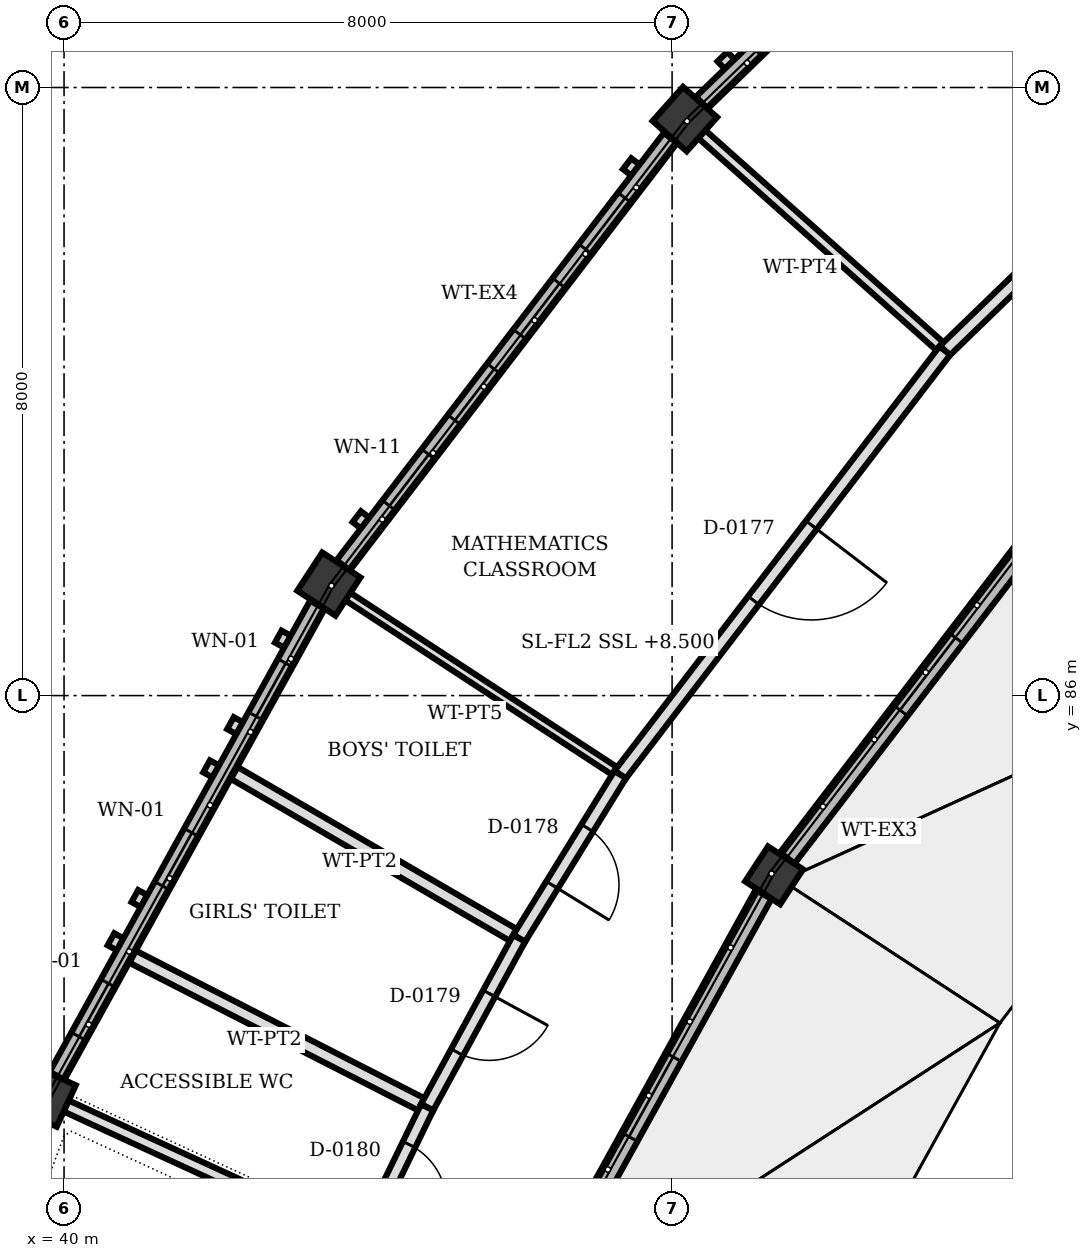
"""IFC4 building model, lengths in metres.
Left out: names, types, materials, properties, quantities, classifications, styles, units other than length and angle.
Written with IfcOpenShell. Run it as: python <this file> out.ifc"""

import sys

from ifc_helpers import new_model, si_unit, direction, frame, frame_2d, origin, origin_2d, place, context, subcontext, project, spatial, rectangle, extrude, element, fill, save


model = new_model("IFC4")
c1 = context("Model", 3, precision=1e-05, world=origin(), true_north=direction((0.0, 1.0)))
c2 = subcontext(c1, "Body", "Model", "MODEL_VIEW")
j1 = project(units=[si_unit("LENGTHUNIT", "METRE"), si_unit("PLANEANGLEUNIT", "RADIAN")], contexts=[c1])
p1 = place(None, origin())
s1 = spatial("IfcSite", under=j1, at=p1, CompositionType="ELEMENT")
p2 = place(p1, origin())
s2 = spatial("IfcBuilding", under=s1, at=p2, CompositionType="ELEMENT")
p3 = place(p2, frame((0.0, 0.0, 8.5)))
s3 = spatial("IfcBuildingStorey", under=s2, at=p3, CompositionType="ELEMENT", Elevation=8.5)
p4 = place(p3, frame((49.342, 83.635, 0.0), z_axis=(0.0, 0.0, 1.0), x_axis=(-0.836840759551, 0.547446383817, 0.0)))
e1 = element("IfcColumn", 1, at=p4, inside=s3, PredefinedType="COLUMN", context=c2, shape_type="SweptSolid", body=[
    extrude(rectangle(XDim=0.55, YDim=0.55, at=origin_2d()), origin(), (0.0, 0.0, 1.0), 4.0),
])
for number, where, z_axis, x_axis in (
    (2, (48.168, 93.584, 0.0), (0.0, 0.0, 1.0), (-0.747, 0.665, 0.0)),
    (3, (43.484, 87.467, 0.0), (0.0, 0.0, 1.0), (-0.837, 0.547, 0.0)),
    (4, (39.756, 80.726, 0.0), (0.0, 0.0, 1.0), (-0.909, 0.418, 0.0)),
):
    element("IfcColumn", number, at=place(p3, frame(where, z_axis=z_axis, x_axis=x_axis)), inside=s3, PredefinedType="COLUMN", context=c2, shape_type="SweptSolid", body=[
        extrude(rectangle(XDim=0.6, YDim=0.6, at=origin_2d()), origin(), (0.0, 0.0, 1.0), 4.0),
    ])
p5 = place(p3, frame((48.391, 93.8, 0.0), z_axis=(0.0, 0.0, 1.0), x_axis=(0.71857824473, 0.695446120272, 0.0)))
e5 = element("IfcWall", 5, at=p5, inside=s3, PredefinedType="SOLIDWALL", context=c2, shape_type="SweptSolid", body=[
    extrude(rectangle(XDim=7.082, YDim=0.22, at=frame_2d((3.541, 0.0))), origin(), (0.0, 0.0, 1.0), 3.192),
])
p6 = place(p5, frame((0.991, 0.0, 0.85)))
e6 = element("IfcOpeningElement", 6, at=p6, cuts=e5, PredefinedType="OPENING", context=c2, shape_type="SweptSolid", body=[
    extrude(rectangle(XDim=0.85, YDim=1.25, at=frame_2d((0.425, 0.625))), frame((0.0, 0.12, 0.0), z_axis=(0.0, -1.0, 0.0), x_axis=(1.0, 0.0, 0.0)), (0.0, 0.0, 1.0), 0.24),
])
p7 = place(p5, frame((2.408, 0.0, 0.85)))
e7 = element("IfcOpeningElement", 7, at=p7, cuts=e5, PredefinedType="OPENING", context=c2, shape_type="SweptSolid", body=[
    extrude(rectangle(XDim=0.85, YDim=1.25, at=frame_2d((0.425, 0.625))), frame((0.0, 0.12, 0.0), z_axis=(0.0, -1.0, 0.0), x_axis=(1.0, 0.0, 0.0)), (0.0, 0.0, 1.0), 0.24),
])
p8 = place(p5, frame((3.824, 0.0, 0.85)))
e8 = element("IfcOpeningElement", 8, at=p8, cuts=e5, PredefinedType="OPENING", context=c2, shape_type="SweptSolid", body=[
    extrude(rectangle(XDim=0.85, YDim=1.25, at=frame_2d((0.425, 0.625))), frame((0.0, 0.12, 0.0), z_axis=(0.0, -1.0, 0.0), x_axis=(1.0, 0.0, 0.0)), (0.0, 0.0, 1.0), 0.24),
])
p9 = place(p5, frame((5.241, 0.0, 0.85)))
e9 = element("IfcOpeningElement", 9, at=p9, cuts=e5, PredefinedType="OPENING", context=c2, shape_type="SweptSolid", body=[
    extrude(rectangle(XDim=0.85, YDim=1.25, at=frame_2d((0.425, 0.625))), frame((0.0, 0.12, 0.0), z_axis=(0.0, -1.0, 0.0), x_axis=(1.0, 0.0, 0.0)), (0.0, 0.0, 1.0), 0.24),
])
p10 = place(p3, frame((43.673, 87.714, 0.0), z_axis=(0.0, 0.0, 1.0), x_axis=(0.607995054755, 0.793940812273, 0.0)))
e10 = element("IfcWall", 10, at=p10, inside=s3, PredefinedType="SOLIDWALL", context=c2, shape_type="SweptSolid", body=[
    extrude(rectangle(XDim=7.082, YDim=0.22, at=frame_2d((3.541, 0.0))), origin(), (0.0, 0.0, 1.0), 3.192),
])
p11 = place(p10, frame((0.991, 0.0, 0.85)))
e11 = element("IfcOpeningElement", 11, at=p11, cuts=e10, PredefinedType="OPENING", context=c2, shape_type="SweptSolid", body=[
    extrude(rectangle(XDim=0.85, YDim=1.25, at=frame_2d((0.425, 0.625))), frame((0.0, 0.12, 0.0), z_axis=(0.0, -1.0, 0.0), x_axis=(1.0, 0.0, 0.0)), (0.0, 0.0, 1.0), 0.24),
])
p12 = place(p10, frame((2.408, 0.0, 0.85)))
e12 = element("IfcOpeningElement", 12, at=p12, cuts=e10, PredefinedType="OPENING", context=c2, shape_type="SweptSolid", body=[
    extrude(rectangle(XDim=0.85, YDim=1.25, at=frame_2d((0.425, 0.625))), frame((0.0, 0.12, 0.0), z_axis=(0.0, -1.0, 0.0), x_axis=(1.0, 0.0, 0.0)), (0.0, 0.0, 1.0), 0.24),
])
p13 = place(p10, frame((3.824, 0.0, 0.85)))
e13 = element("IfcOpeningElement", 13, at=p13, cuts=e10, PredefinedType="OPENING", context=c2, shape_type="SweptSolid", body=[
    extrude(rectangle(XDim=0.85, YDim=1.25, at=frame_2d((0.425, 0.625))), frame((0.0, 0.12, 0.0), z_axis=(0.0, -1.0, 0.0), x_axis=(1.0, 0.0, 0.0)), (0.0, 0.0, 1.0), 0.24),
])
p14 = place(p10, frame((5.241, 0.0, 0.85)))
e14 = element("IfcOpeningElement", 14, at=p14, cuts=e10, PredefinedType="OPENING", context=c2, shape_type="SweptSolid", body=[
    extrude(rectangle(XDim=0.85, YDim=1.25, at=frame_2d((0.425, 0.625))), frame((0.0, 0.12, 0.0), z_axis=(0.0, -1.0, 0.0), x_axis=(1.0, 0.0, 0.0)), (0.0, 0.0, 1.0), 0.24),
])
p15 = place(p3, frame((53.221, 88.7, 0.0), z_axis=(0.0, 0.0, 1.0), x_axis=(-0.608073116508, -0.793881026969, 0.0)))
e15 = element("IfcWall", 15, at=p15, inside=s3, PredefinedType="SOLIDWALL", context=c2, shape_type="SweptSolid", body=[
    extrude(rectangle(XDim=6.093, YDim=0.24, at=frame_2d((3.046, 0.0))), origin(), (0.0, 0.0, 1.0), 3.05),
])
p16 = place(p15, frame((2.446, 0.0, 2.05)))
e16 = element("IfcOpeningElement", 16, at=p16, cuts=e15, PredefinedType="OPENING", context=c2, shape_type="SweptSolid", body=[
    extrude(rectangle(XDim=1.2, YDim=0.85, at=frame_2d((0.6, 0.425))), frame((0.0, 0.13, 0.0), z_axis=(0.0, -1.0, 0.0), x_axis=(1.0, 0.0, 0.0)), (0.0, 0.0, 1.0), 0.26),
])
p17 = place(p3, frame((39.907, 80.998, 0.0), z_axis=(0.0, 0.0, 1.0), x_axis=(0.483832760768, 0.875160476489, 0.0)))
e17 = element("IfcWall", 17, at=p17, inside=s3, PredefinedType="SOLIDWALL", context=c2, shape_type="SweptSolid", body=[
    extrude(rectangle(XDim=7.081, YDim=0.22, at=frame_2d((3.541, 0.0))), origin(), (0.0, 0.0, 1.0), 3.192),
])
p18 = place(p17, frame((0.591, 0.0, 1.15)))
e18 = element("IfcOpeningElement", 18, at=p18, cuts=e17, PredefinedType="OPENING", context=c2, shape_type="SweptSolid", body=[
    extrude(rectangle(XDim=0.8, YDim=1.1, at=frame_2d((0.4, 0.55))), frame((0.0, 0.12, 0.0), z_axis=(0.0, -1.0, 0.0), x_axis=(1.0, 0.0, 0.0)), (0.0, 0.0, 1.0), 0.24),
])
p19 = place(p17, frame((2.857, 0.0, 1.15)))
e19 = element("IfcOpeningElement", 19, at=p19, cuts=e17, PredefinedType="OPENING", context=c2, shape_type="SweptSolid", body=[
    extrude(rectangle(XDim=0.8, YDim=1.1, at=frame_2d((0.4, 0.55))), frame((0.0, 0.12, 0.0), z_axis=(0.0, -1.0, 0.0), x_axis=(1.0, 0.0, 0.0)), (0.0, 0.0, 1.0), 0.24),
])
p20 = place(p17, frame((5.406, 0.0, 1.15)))
e20 = element("IfcOpeningElement", 20, at=p20, cuts=e17, PredefinedType="OPENING", context=c2, shape_type="SweptSolid", body=[
    extrude(rectangle(XDim=0.8, YDim=1.1, at=frame_2d((0.4, 0.55))), frame((0.0, 0.12, 0.0), z_axis=(0.0, -1.0, 0.0), x_axis=(1.0, 0.0, 0.0)), (0.0, 0.0, 1.0), 0.24),
])
p21 = place(p3, frame((49.203, 83.384, 0.0), z_axis=(0.0, 0.0, 1.0), x_axis=(-0.483855739492, -0.875147772299, 0.0)))
e21 = element("IfcWall", 21, at=p21, inside=s3, PredefinedType="SOLIDWALL", context=c2, shape_type="SweptSolid", body=[
    extrude(rectangle(XDim=6.093, YDim=0.24, at=frame_2d((3.046, 0.0))), origin(), (0.0, 0.0, 1.0), 3.05),
])
p22 = place(p21, frame((2.446, 0.0, 2.05)))
e22 = element("IfcOpeningElement", 22, at=p22, cuts=e21, PredefinedType="OPENING", context=c2, shape_type="SweptSolid", body=[
    extrude(rectangle(XDim=1.2, YDim=0.85, at=frame_2d((0.6, 0.425))), frame((0.0, 0.13, 0.0), z_axis=(0.0, -1.0, 0.0), x_axis=(1.0, 0.0, 0.0)), (0.0, 0.0, 1.0), 0.26),
])
p23 = place(p3, frame((51.588, 90.538, 0.0), z_axis=(0.0, 0.0, 1.0), x_axis=(-0.746752390412, 0.665102148105, 0.0)))
e23 = element("IfcWall", 23, at=p23, inside=s3, PredefinedType="PARTITIONING", context=c2, shape_type="SweptSolid", body=[
    extrude(rectangle(XDim=4.288, YDim=0.14, at=frame_2d((2.144, 0.0))), origin(), (0.0, 0.0, 1.0), 3.092),
])
p24 = place(p3, frame((47.317, 84.96, 0.0), z_axis=(0.0, 0.0, 1.0), x_axis=(-0.836931498536, 0.54730765275, 0.0)))
e24 = element("IfcWall", 24, at=p24, inside=s3, PredefinedType="PARTITIONING", context=c2, shape_type="SweptSolid", body=[
    extrude(rectangle(XDim=4.288, YDim=0.12, at=frame_2d((2.144, 0.0))), origin(), (0.0, 0.0, 1.0), 3.092),
])
p25 = place(p3, frame((43.917, 78.812, 0.0), z_axis=(0.0, 0.0, 1.0), x_axis=(-0.908505150055, 0.417873655934, 0.0)))
e25 = element("IfcWall", 25, at=p25, inside=s3, PredefinedType="PARTITIONING", context=c2, shape_type="SweptSolid", body=[
    extrude(rectangle(XDim=4.288, YDim=0.16, at=frame_2d((2.144, 0.0))), origin(), (0.0, 0.0, 1.0), 3.092),
])
p26 = place(p3, frame((45.988, 82.806, 0.0), z_axis=(0.0, 0.0, 1.0), x_axis=(-0.864871773355, 0.501992844225, 0.0)))
e26 = element("IfcWall", 26, at=p26, inside=s3, PredefinedType="PARTITIONING", context=c2, shape_type="SweptSolid", body=[
    extrude(rectangle(XDim=4.335, YDim=0.18, at=frame_2d((2.167, 0.0))), origin(), (0.0, 0.0, 1.0), 3.192),
])
p27 = place(p3, frame((44.777, 80.583, 0.0), z_axis=(0.0, 0.0, 1.0), x_axis=(-0.890397294755, 0.455184201717, 0.0)))
e27 = element("IfcWall", 27, at=p27, inside=s3, PredefinedType="PARTITIONING", context=c2, shape_type="SweptSolid", body=[
    extrude(rectangle(XDim=4.352, YDim=0.18, at=frame_2d((2.176, 0.0))), origin(), (0.0, 0.0, 1.0), 3.192),
])
p28 = place(p3, frame((56.636, 95.424, 0.0), z_axis=(0.0, 0.0, 1.0), x_axis=(-0.718550040998, -0.695475260942, 0.0)))
e28 = element("IfcWall", 28, at=p28, inside=s3, PredefinedType="PARTITIONING", context=c2, shape_type="SweptSolid", body=[
    extrude(rectangle(XDim=7.025, YDim=0.18, at=frame_2d((3.513, 0.0))), origin(), (0.0, 0.0, 1.0), 3.092),
])
p29 = place(p28, frame((3.023, 0.0, 0.0)))
e29 = element("IfcOpeningElement", 29, at=p29, cuts=e28, PredefinedType="OPENING", context=c2, shape_type="SweptSolid", body=[
    extrude(rectangle(XDim=0.98, YDim=2.2, at=frame_2d((0.49, 1.1))), frame((0.0, 0.1, 0.0), z_axis=(0.0, -1.0, 0.0), x_axis=(1.0, 0.0, 0.0)), (0.0, 0.0, 1.0), 0.2),
])
p30 = place(p3, frame((51.588, 90.538, 0.0), z_axis=(0.0, 0.0, 1.0), x_axis=(-0.607932411016, -0.793988780548, 0.0)))
e30 = element("IfcWall", 30, at=p30, inside=s3, PredefinedType="PARTITIONING", context=c2, shape_type="SweptSolid", body=[
    extrude(rectangle(XDim=7.025, YDim=0.18, at=frame_2d((3.513, 0.0))), origin(), (0.0, 0.0, 1.0), 3.092),
])
p31 = place(p30, frame((2.888, 0.0, 0.0)))
e31 = element("IfcOpeningElement", 31, at=p31, cuts=e30, PredefinedType="OPENING", context=c2, shape_type="SweptSolid", body=[
    extrude(rectangle(XDim=1.25, YDim=2.2, at=frame_2d((0.625, 1.1))), frame((0.0, 0.1, 0.0), z_axis=(0.0, -1.0, 0.0), x_axis=(1.0, 0.0, 0.0)), (0.0, 0.0, 1.0), 0.2),
])
p32 = place(p3, frame((47.317, 84.96, 0.0), z_axis=(0.0, 0.0, 1.0), x_axis=(-0.52503894851, -0.851078200019, 0.0)))
e32 = element("IfcWall", 32, at=p32, inside=s3, PredefinedType="PARTITIONING", context=c2, shape_type="SweptSolid", body=[
    extrude(rectangle(XDim=2.531, YDim=0.18, at=frame_2d((1.266, 0.0))), origin(), (0.0, 0.0, 1.0), 3.092),
])
p33 = place(p32, frame((0.825, 0.0, 0.0)))
e33 = element("IfcOpeningElement", 33, at=p33, cuts=e32, PredefinedType="OPENING", context=c2, shape_type="SweptSolid", body=[
    extrude(rectangle(XDim=0.88, YDim=2.1, at=frame_2d((0.44, 1.05))), frame((0.0, 0.1, 0.0), z_axis=(0.0, -1.0, 0.0), x_axis=(1.0, 0.0, 0.0)), (0.0, 0.0, 1.0), 0.2),
])
p34 = place(p3, frame((45.988, 82.806, 0.0), z_axis=(0.0, 0.0, 1.0), x_axis=(-0.478379038954, -0.878153457597, 0.0)))
e34 = element("IfcWall", 34, at=p34, inside=s3, PredefinedType="PARTITIONING", context=c2, shape_type="SweptSolid", body=[
    extrude(rectangle(XDim=2.531, YDim=0.18, at=frame_2d((1.266, 0.0))), origin(), (0.0, 0.0, 1.0), 3.7),
])
p35 = place(p34, frame((0.826, 0.0, 0.0)))
e35 = element("IfcOpeningElement", 35, at=p35, cuts=e34, PredefinedType="OPENING", context=c2, shape_type="SweptSolid", body=[
    extrude(rectangle(XDim=0.88, YDim=2.1, at=frame_2d((0.44, 1.05))), frame((0.0, 0.1, 0.0), z_axis=(0.0, -1.0, 0.0), x_axis=(1.0, 0.0, 0.0)), (0.0, 0.0, 1.0), 0.2),
])
p36 = place(p3, frame((44.777, 80.583, 0.0), z_axis=(0.0, 0.0, 1.0), x_axis=(-0.436866695587, -0.899526258809, 0.0)))
e36 = element("IfcWall", 36, at=p36, inside=s3, PredefinedType="PARTITIONING", context=c2, shape_type="SweptSolid", body=[
    extrude(rectangle(XDim=1.969, YDim=0.18, at=frame_2d((0.984, 0.0))), origin(), (0.0, 0.0, 1.0), 3.092),
])
p37 = place(p36, frame((0.544, 0.0, 0.0)))
e37 = element("IfcOpeningElement", 37, at=p37, cuts=e36, PredefinedType="OPENING", context=c2, shape_type="SweptSolid", body=[
    extrude(rectangle(XDim=0.88, YDim=2.1, at=frame_2d((0.44, 1.05))), frame((0.0, 0.1, 0.0), z_axis=(0.0, -1.0, 0.0), x_axis=(1.0, 0.0, 0.0)), (0.0, 0.0, 1.0), 0.2),
])
p38 = place(p11, origin())
e38 = element("IfcWindow", 38, at=p38, inside=s3, PartitioningType="SINGLE_PANEL", PredefinedType="WINDOW", context=c2, shape_type="SweptSolid", body=[
    extrude(rectangle(XDim=0.85, YDim=1.25, at=frame_2d((0.425, 0.625))), frame((0.0, 0.03, 0.0), z_axis=(0.0, -1.0, 0.0), x_axis=(1.0, 0.0, 0.0)), (0.0, 0.0, 1.0), 0.06),
])
fill(e11, e38)
p39 = place(p12, origin())
e39 = element("IfcWindow", 39, at=p39, inside=s3, PartitioningType="SINGLE_PANEL", PredefinedType="WINDOW", context=c2, shape_type="SweptSolid", body=[
    extrude(rectangle(XDim=0.85, YDim=1.25, at=frame_2d((0.425, 0.625))), frame((0.0, 0.03, 0.0), z_axis=(0.0, -1.0, 0.0), x_axis=(1.0, 0.0, 0.0)), (0.0, 0.0, 1.0), 0.06),
])
fill(e12, e39)
p40 = place(p13, origin())
e40 = element("IfcWindow", 40, at=p40, inside=s3, PartitioningType="SINGLE_PANEL", PredefinedType="WINDOW", context=c2, shape_type="SweptSolid", body=[
    extrude(rectangle(XDim=0.85, YDim=1.25, at=frame_2d((0.425, 0.625))), frame((0.0, 0.03, 0.0), z_axis=(0.0, -1.0, 0.0), x_axis=(1.0, 0.0, 0.0)), (0.0, 0.0, 1.0), 0.06),
])
fill(e13, e40)
p41 = place(p14, origin())
e41 = element("IfcWindow", 41, at=p41, inside=s3, PartitioningType="SINGLE_PANEL", PredefinedType="WINDOW", context=c2, shape_type="SweptSolid", body=[
    extrude(rectangle(XDim=0.85, YDim=1.25, at=frame_2d((0.425, 0.625))), frame((0.0, 0.03, 0.0), z_axis=(0.0, -1.0, 0.0), x_axis=(1.0, 0.0, 0.0)), (0.0, 0.0, 1.0), 0.06),
])
fill(e14, e41)
p42 = place(p16, origin())
e42 = element("IfcWindow", 42, at=p42, inside=s3, PartitioningType="SINGLE_PANEL", PredefinedType="WINDOW", context=c2, shape_type="SweptSolid", body=[
    extrude(rectangle(XDim=1.2, YDim=0.85, at=frame_2d((0.6, 0.425))), frame((0.0, 0.03, 0.0), z_axis=(0.0, -1.0, 0.0), x_axis=(1.0, 0.0, 0.0)), (0.0, 0.0, 1.0), 0.06),
])
fill(e16, e42)
p43 = place(p18, origin())
e43 = element("IfcWindow", 43, at=p43, inside=s3, PartitioningType="SINGLE_PANEL", PredefinedType="WINDOW", context=c2, shape_type="SweptSolid", body=[
    extrude(rectangle(XDim=0.8, YDim=1.1, at=frame_2d((0.4, 0.55))), frame((0.0, 0.03, 0.0), z_axis=(0.0, -1.0, 0.0), x_axis=(1.0, 0.0, 0.0)), (0.0, 0.0, 1.0), 0.06),
])
fill(e18, e43)
p44 = place(p19, origin())
e44 = element("IfcWindow", 44, at=p44, inside=s3, PartitioningType="SINGLE_PANEL", PredefinedType="WINDOW", context=c2, shape_type="SweptSolid", body=[
    extrude(rectangle(XDim=0.8, YDim=1.1, at=frame_2d((0.4, 0.55))), frame((0.0, 0.03, 0.0), z_axis=(0.0, -1.0, 0.0), x_axis=(1.0, 0.0, 0.0)), (0.0, 0.0, 1.0), 0.06),
])
fill(e19, e44)
p45 = place(p20, origin())
e45 = element("IfcWindow", 45, at=p45, inside=s3, PartitioningType="SINGLE_PANEL", PredefinedType="WINDOW", context=c2, shape_type="SweptSolid", body=[
    extrude(rectangle(XDim=0.8, YDim=1.1, at=frame_2d((0.4, 0.55))), frame((0.0, 0.03, 0.0), z_axis=(0.0, -1.0, 0.0), x_axis=(1.0, 0.0, 0.0)), (0.0, 0.0, 1.0), 0.06),
])
fill(e20, e45)
p46 = place(p22, origin())
e46 = element("IfcWindow", 46, at=p46, inside=s3, PartitioningType="SINGLE_PANEL", PredefinedType="WINDOW", context=c2, shape_type="SweptSolid", body=[
    extrude(rectangle(XDim=1.2, YDim=0.85, at=frame_2d((0.6, 0.425))), frame((0.0, 0.03, 0.0), z_axis=(0.0, -1.0, 0.0), x_axis=(1.0, 0.0, 0.0)), (0.0, 0.0, 1.0), 0.06),
])
fill(e22, e46)
p47 = place(p31, origin())
e47 = element("IfcDoor", 47, at=p47, inside=s3, OperationType="SINGLE_SWING_LEFT", PredefinedType="DOOR", context=c2, shape_type="SweptSolid", body=[
    extrude(rectangle(XDim=1.25, YDim=2.2, at=frame_2d((0.625, 1.1))), frame((0.0, 0.025, 0.0), z_axis=(0.0, -1.0, 0.0), x_axis=(1.0, 0.0, 0.0)), (0.0, 0.0, 1.0), 0.05),
])
fill(e31, e47)
p48 = place(p33, origin())
e48 = element("IfcDoor", 48, at=p48, inside=s3, OperationType="SINGLE_SWING_RIGHT", PredefinedType="DOOR", context=c2, shape_type="SweptSolid", body=[
    extrude(rectangle(XDim=0.88, YDim=2.1, at=frame_2d((0.44, 1.05))), frame((0.0, 0.025, 0.0), z_axis=(0.0, -1.0, 0.0), x_axis=(1.0, 0.0, 0.0)), (0.0, 0.0, 1.0), 0.05),
])
fill(e33, e48)
p49 = place(p35, origin())
e49 = element("IfcDoor", 49, at=p49, inside=s3, OperationType="SINGLE_SWING_LEFT", PredefinedType="DOOR", context=c2, shape_type="SweptSolid", body=[
    extrude(rectangle(XDim=0.88, YDim=2.1, at=frame_2d((0.44, 1.05))), frame((0.0, 0.025, 0.0), z_axis=(0.0, -1.0, 0.0), x_axis=(1.0, 0.0, 0.0)), (0.0, 0.0, 1.0), 0.05),
])
fill(e35, e49)
p50 = place(p37, origin())
e50 = element("IfcDoor", 50, at=p50, inside=s3, OperationType="SINGLE_SWING_RIGHT", PredefinedType="DOOR", context=c2, shape_type="SweptSolid", body=[
    extrude(rectangle(XDim=0.88, YDim=2.1, at=frame_2d((0.44, 1.05))), frame((0.0, 0.025, 0.0), z_axis=(0.0, -1.0, 0.0), x_axis=(1.0, 0.0, 0.0)), (0.0, 0.0, 1.0), 0.05),
])
fill(e37, e50)
save(model, sys.argv[1])
